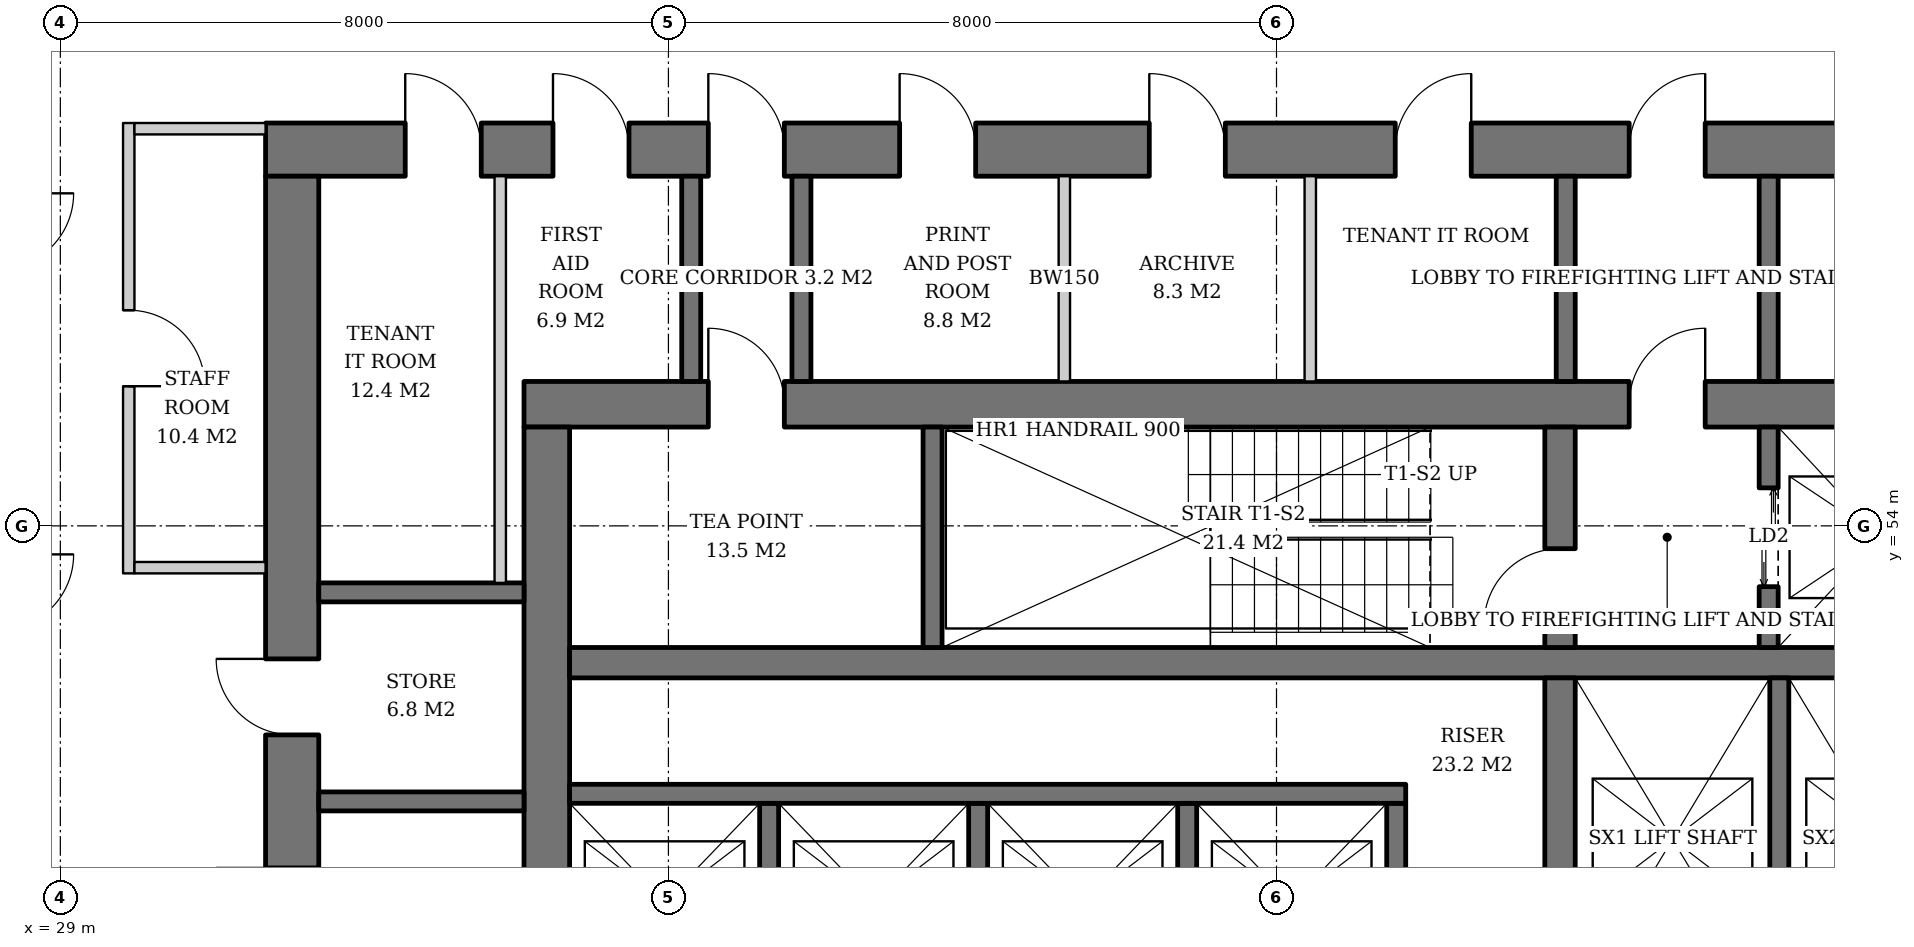
"""IFC4 building model, lengths in metres.
Left out: names, types, materials, properties, quantities, classifications, styles, units other than length and angle.
Written with IfcOpenShell. Run it as: python <this file> out.ifc"""

import sys

from ifc_helpers import new_model, si_unit, direction, frame, frame_2d, origin, place, context, subcontext, project, spatial, rectangle, extrude, element, fill, save


model = new_model("IFC4")
c1 = context("Model", 3, precision=1e-05, world=origin(), true_north=direction((0.0, 1.0)))
c2 = subcontext(c1, "Body", "Model", "MODEL_VIEW")
j1 = project(units=[si_unit("LENGTHUNIT", "METRE"), si_unit("PLANEANGLEUNIT", "RADIAN")], contexts=[c1])
p1 = place(None, origin())
s1 = spatial("IfcSite", under=j1, at=p1, CompositionType="ELEMENT")
p2 = place(p1, origin())
s2 = spatial("IfcBuilding", under=s1, at=p2, CompositionType="ELEMENT")
p3 = place(p2, frame((0.0, 0.0, 123.6)))
s3 = spatial("IfcBuildingStorey", under=s2, at=p3, CompositionType="ELEMENT", Elevation=123.6)
p4 = place(p3, frame((35.1, 55.6, 0.0), z_axis=(0.0, 0.0, 1.0), x_axis=(1.0, 0.0, 0.0)))
e1 = element("IfcWall", 1, at=p4, inside=s3, PredefinedType="SHEAR", context=c2, shape_type="SweptSolid", body=[
    extrude(rectangle(XDim=19.8, YDim=0.6, at=frame_2d((9.9, 0.0))), origin(), (0.0, 0.0, 1.0), 3.8),
])
p5 = place(p4, frame((14.54, 0.0, 0.0)))
e2 = element("IfcOpeningElement", 2, at=p5, cuts=e1, PredefinedType="OPENING", context=c2, shape_type="SweptSolid", body=[
    extrude(rectangle(XDim=1.0, YDim=2.1, at=frame_2d((0.5, 1.05))), frame((0.0, 0.31, 0.0), z_axis=(0.0, -1.0, 0.0), x_axis=(1.0, 0.0, 0.0)), (0.0, 0.0, 1.0), 0.62),
])
p6 = place(p4, frame((2.425, 0.0, 0.0)))
e3 = element("IfcOpeningElement", 3, at=p6, cuts=e1, PredefinedType="OPENING", context=c2, shape_type="SweptSolid", body=[
    extrude(rectangle(XDim=1.0, YDim=2.1, at=frame_2d((0.5, 1.05))), frame((0.0, 0.31, 0.0), z_axis=(0.0, -1.0, 0.0), x_axis=(1.0, 0.0, 0.0)), (0.0, 0.0, 1.0), 0.62),
])
p7 = place(p3, frame((35.4, 36.7, 0.0), z_axis=(0.0, 0.0, 1.0), x_axis=(0.0, 1.0, 0.0)))
e4 = element("IfcWall", 4, at=p7, inside=s3, PredefinedType="SHEAR", context=c2, shape_type="SweptSolid", body=[
    extrude(rectangle(XDim=18.6, YDim=0.6, at=frame_2d((9.3, 0.0))), origin(), (0.0, 0.0, 1.0), 3.8),
])
p8 = place(p7, frame((8.4, 0.0, 0.0)))
e5 = element("IfcOpeningElement", 5, at=p8, cuts=e4, PredefinedType="OPENING", context=c2, shape_type="SweptSolid", body=[
    extrude(rectangle(XDim=1.8, YDim=2.4, at=frame_2d((0.9, 1.2))), frame((0.0, 0.31, 0.0), z_axis=(0.0, -1.0, 0.0), x_axis=(1.0, 0.0, 0.0)), (0.0, 0.0, 1.0), 0.62),
])
p9 = place(p3, frame((31.7, 58.95, 0.0), z_axis=(0.0, 0.0, 1.0), x_axis=(1.0, 0.0, 0.0)))
e6 = element("IfcWall", 6, at=p9, inside=s3, PredefinedType="SHEAR", context=c2, shape_type="SweptSolid", body=[
    extrude(rectangle(XDim=26.6, YDim=0.7, at=frame_2d((13.3, 0.0))), origin(), (0.0, 0.0, 1.0), 3.8),
])
p10 = place(p9, frame((17.94, 0.0, 0.0)))
e7 = element("IfcOpeningElement", 7, at=p10, cuts=e6, PredefinedType="OPENING", context=c2, shape_type="SweptSolid", body=[
    extrude(rectangle(XDim=1.0, YDim=2.1, at=frame_2d((0.5, 1.05))), frame((0.0, 0.36, 0.0), z_axis=(0.0, -1.0, 0.0), x_axis=(1.0, 0.0, 0.0)), (0.0, 0.0, 1.0), 0.72),
])
p11 = place(p9, frame((5.825, 0.0, 0.0)))
e8 = element("IfcOpeningElement", 8, at=p11, cuts=e6, PredefinedType="OPENING", context=c2, shape_type="SweptSolid", body=[
    extrude(rectangle(XDim=1.0, YDim=2.1, at=frame_2d((0.5, 1.05))), frame((0.0, 0.36, 0.0), z_axis=(0.0, -1.0, 0.0), x_axis=(1.0, 0.0, 0.0)), (0.0, 0.0, 1.0), 0.72),
])
p12 = place(p9, frame((1.837, 0.0, 0.0)))
e9 = element("IfcOpeningElement", 9, at=p12, cuts=e6, PredefinedType="OPENING", context=c2, shape_type="SweptSolid", body=[
    extrude(rectangle(XDim=1.0, YDim=2.1, at=frame_2d((0.5, 1.05))), frame((0.0, 0.36, 0.0), z_axis=(0.0, -1.0, 0.0), x_axis=(1.0, 0.0, 0.0)), (0.0, 0.0, 1.0), 0.72),
])
p13 = place(p9, frame((3.781, 0.0, 0.0)))
e10 = element("IfcOpeningElement", 10, at=p13, cuts=e6, PredefinedType="OPENING", context=c2, shape_type="SweptSolid", body=[
    extrude(rectangle(XDim=1.0, YDim=2.1, at=frame_2d((0.5, 1.05))), frame((0.0, 0.36, 0.0), z_axis=(0.0, -1.0, 0.0), x_axis=(1.0, 0.0, 0.0)), (0.0, 0.0, 1.0), 0.72),
])
p14 = place(p9, frame((8.342, 0.0, 0.0)))
e11 = element("IfcOpeningElement", 11, at=p14, cuts=e6, PredefinedType="OPENING", context=c2, shape_type="SweptSolid", body=[
    extrude(rectangle(XDim=1.0, YDim=2.1, at=frame_2d((0.5, 1.05))), frame((0.0, 0.36, 0.0), z_axis=(0.0, -1.0, 0.0), x_axis=(1.0, 0.0, 0.0)), (0.0, 0.0, 1.0), 0.72),
])
p15 = place(p9, frame((11.626, 0.0, 0.0)))
e12 = element("IfcOpeningElement", 12, at=p15, cuts=e6, PredefinedType="OPENING", context=c2, shape_type="SweptSolid", body=[
    extrude(rectangle(XDim=1.0, YDim=2.1, at=frame_2d((0.5, 1.05))), frame((0.0, 0.36, 0.0), z_axis=(0.0, -1.0, 0.0), x_axis=(1.0, 0.0, 0.0)), (0.0, 0.0, 1.0), 0.72),
])
p16 = place(p9, frame((14.862, 0.0, 0.0)))
e13 = element("IfcOpeningElement", 13, at=p16, cuts=e6, PredefinedType="OPENING", context=c2, shape_type="SweptSolid", body=[
    extrude(rectangle(XDim=1.0, YDim=2.1, at=frame_2d((0.5, 1.05))), frame((0.0, 0.36, 0.0), z_axis=(0.0, -1.0, 0.0), x_axis=(1.0, 0.0, 0.0)), (0.0, 0.0, 1.0), 0.72),
])
p17 = place(p9, frame((20.9, 0.0, 0.0)))
e14 = element("IfcOpeningElement", 14, at=p17, cuts=e6, PredefinedType="OPENING", context=c2, shape_type="SweptSolid", body=[
    extrude(rectangle(XDim=1.0, YDim=2.1, at=frame_2d((0.5, 1.05))), frame((0.0, 0.36, 0.0), z_axis=(0.0, -1.0, 0.0), x_axis=(1.0, 0.0, 0.0)), (0.0, 0.0, 1.0), 0.72),
])
p18 = place(p9, frame((23.75, 0.0, 0.0)))
e15 = element("IfcOpeningElement", 15, at=p18, cuts=e6, PredefinedType="OPENING", context=c2, shape_type="SweptSolid", body=[
    extrude(rectangle(XDim=1.0, YDim=2.1, at=frame_2d((0.5, 1.05))), frame((0.0, 0.36, 0.0), z_axis=(0.0, -1.0, 0.0), x_axis=(1.0, 0.0, 0.0)), (0.0, 0.0, 1.0), 0.72),
])
p19 = place(p3, frame((32.05, 33.4, 0.0), z_axis=(0.0, 0.0, 1.0), x_axis=(0.0, 1.0, 0.0)))
e16 = element("IfcWall", 16, at=p19, inside=s3, PredefinedType="SHEAR", context=c2, shape_type="SweptSolid", body=[
    extrude(rectangle(XDim=25.2, YDim=0.7, at=frame_2d((12.6, 0.0))), origin(), (0.0, 0.0, 1.0), 3.8),
])
p20 = place(p19, frame((11.7, 0.0, 0.0)))
e17 = element("IfcOpeningElement", 17, at=p20, cuts=e16, PredefinedType="OPENING", context=c2, shape_type="SweptSolid", body=[
    extrude(rectangle(XDim=1.8, YDim=2.4, at=frame_2d((0.9, 1.2))), frame((0.0, 0.36, 0.0), z_axis=(0.0, -1.0, 0.0), x_axis=(1.0, 0.0, 0.0)), (0.0, 0.0, 1.0), 0.72),
])
p21 = place(p19, frame((3.6, 0.0, 0.0)))
e18 = element("IfcOpeningElement", 18, at=p21, cuts=e16, PredefinedType="OPENING", context=c2, shape_type="SweptSolid", body=[
    extrude(rectangle(XDim=1.0, YDim=2.1, at=frame_2d((0.5, 1.05))), frame((0.0, 0.36, 0.0), z_axis=(0.0, -1.0, 0.0), x_axis=(1.0, 0.0, 0.0)), (0.0, 0.0, 1.0), 0.72),
])
p22 = place(p19, frame((6.35, 0.0, 0.0)))
e19 = element("IfcOpeningElement", 19, at=p22, cuts=e16, PredefinedType="OPENING", context=c2, shape_type="SweptSolid", body=[
    extrude(rectangle(XDim=1.0, YDim=2.1, at=frame_2d((0.5, 1.05))), frame((0.0, 0.36, 0.0), z_axis=(0.0, -1.0, 0.0), x_axis=(1.0, 0.0, 0.0)), (0.0, 0.0, 1.0), 0.72),
])
p23 = place(p19, frame((9.1, 0.0, 0.0)))
e20 = element("IfcOpeningElement", 20, at=p23, cuts=e16, PredefinedType="OPENING", context=c2, shape_type="SweptSolid", body=[
    extrude(rectangle(XDim=1.0, YDim=2.1, at=frame_2d((0.5, 1.05))), frame((0.0, 0.36, 0.0), z_axis=(0.0, -1.0, 0.0), x_axis=(1.0, 0.0, 0.0)), (0.0, 0.0, 1.0), 0.72),
])
p24 = place(p19, frame((15.1, 0.0, 0.0)))
e21 = element("IfcOpeningElement", 21, at=p24, cuts=e16, PredefinedType="OPENING", context=c2, shape_type="SweptSolid", body=[
    extrude(rectangle(XDim=1.0, YDim=2.1, at=frame_2d((0.5, 1.05))), frame((0.0, 0.36, 0.0), z_axis=(0.0, -1.0, 0.0), x_axis=(1.0, 0.0, 0.0)), (0.0, 0.0, 1.0), 0.72),
])
p25 = place(p19, frame((17.85, 0.0, 0.0)))
e22 = element("IfcOpeningElement", 22, at=p25, cuts=e16, PredefinedType="OPENING", context=c2, shape_type="SweptSolid", body=[
    extrude(rectangle(XDim=1.0, YDim=2.1, at=frame_2d((0.5, 1.05))), frame((0.0, 0.36, 0.0), z_axis=(0.0, -1.0, 0.0), x_axis=(1.0, 0.0, 0.0)), (0.0, 0.0, 1.0), 0.72),
])
p26 = place(p3, frame((35.7, 52.2, 0.0), z_axis=(0.0, 0.0, 1.0), x_axis=(1.0, 0.0, 0.0)))
e23 = element("IfcWall", 23, at=p26, inside=s3, PredefinedType="SHEAR", context=c2, shape_type="SweptSolid", body=[
    extrude(rectangle(XDim=18.6, YDim=0.4, at=frame_2d((9.3, 0.0))), origin(), (0.0, 0.0, 1.0), 3.8),
])
p27 = place(p3, frame((48.73, 40.0, 0.0), z_axis=(0.0, 0.0, 1.0), x_axis=(0.0, 1.0, 0.0)))
e24 = element("IfcWall", 24, at=p27, inside=s3, PredefinedType="SHEAR", context=c2, shape_type="SweptSolid", body=[
    extrude(rectangle(XDim=12.0, YDim=0.4, at=frame_2d((6.0, 0.0))), origin(), (0.0, 0.0, 1.0), 3.8),
])
p28 = place(p3, frame((48.73, 52.4, 0.0), z_axis=(0.0, 0.0, 1.0), x_axis=(0.0, 1.0, 0.0)))
e25 = element("IfcWall", 25, at=p28, inside=s3, PredefinedType="SHEAR", context=c2, shape_type="SweptSolid", body=[
    extrude(rectangle(XDim=2.9, YDim=0.4, at=frame_2d((1.45, 0.0))), origin(), (0.0, 0.0, 1.0), 3.8),
])
p29 = place(p28, frame((0.3, 0.0, 0.0)))
e26 = element("IfcOpeningElement", 26, at=p29, cuts=e25, PredefinedType="OPENING", context=c2, shape_type="SweptSolid", body=[
    extrude(rectangle(XDim=1.0, YDim=2.1, at=frame_2d((0.5, 1.05))), frame((0.0, 0.21, 0.0), z_axis=(0.0, -1.0, 0.0), x_axis=(1.0, 0.0, 0.0)), (0.0, 0.0, 1.0), 0.42),
])
p30 = place(p3, frame((40.475, 52.4, 0.0), z_axis=(0.0, 0.0, 1.0), x_axis=(0.0, 1.0, 0.0)))
e27 = element("IfcWall", 27, at=p30, inside=s3, PredefinedType="SHEAR", context=c2, shape_type="SweptSolid", body=[
    extrude(rectangle(XDim=2.9, YDim=0.25, at=frame_2d((1.45, 0.0))), origin(), (0.0, 0.0, 1.0), 3.8),
])
p31 = place(p3, frame((51.475, 52.4, 0.0), z_axis=(0.0, 0.0, 1.0), x_axis=(0.0, 1.0, 0.0)))
e28 = element("IfcWall", 28, at=p31, inside=s3, PredefinedType="SHEAR", context=c2, shape_type="SweptSolid", body=[
    extrude(rectangle(XDim=2.9, YDim=0.25, at=frame_2d((1.45, 0.0))), origin(), (0.0, 0.0, 1.0), 3.8),
])
p32 = place(p31, frame((0.8, 0.0, 0.0)))
e29 = element("IfcOpeningElement", 29, at=p32, cuts=e28, PredefinedType="OPENING", context=c2, shape_type="SweptSolid", body=[
    extrude(rectangle(XDim=1.3, YDim=2.2, at=frame_2d((0.65, 1.1))), frame((0.0, 0.135, 0.0), z_axis=(0.0, -1.0, 0.0), x_axis=(1.0, 0.0, 0.0)), (0.0, 0.0, 1.0), 0.27),
])
for number, where, z_axis, x_axis in (
    (30, (38.325, 47.75, 0.0), (0.0, 0.0, 1.0), (0.0, 1.0, 0.0)),
    (31, (41.075, 47.75, 0.0), (0.0, 0.0, 1.0), (0.0, 1.0, 0.0)),
    (32, (43.825, 47.75, 0.0), (0.0, 0.0, 1.0), (0.0, 1.0, 0.0)),
    (33, (46.575, 47.75, 0.0), (0.0, 0.0, 1.0), (0.0, 1.0, 0.0)),
):
    element("IfcWall", number, at=place(p3, frame(where, z_axis=z_axis, x_axis=x_axis)), inside=s3, PredefinedType="SHEAR", context=c2, shape_type="SweptSolid", body=[
        extrude(rectangle(XDim=2.6, YDim=0.25, at=frame_2d((1.3, 0.0))), origin(), (0.0, 0.0, 1.0), 3.8),
    ])
p33 = place(p3, frame((35.7, 50.475, 0.0), z_axis=(0.0, 0.0, 1.0), x_axis=(1.0, 0.0, 0.0)))
e34 = element("IfcWall", 34, at=p33, inside=s3, PredefinedType="SHEAR", context=c2, shape_type="SweptSolid", body=[
    extrude(rectangle(XDim=11.0, YDim=0.25, at=frame_2d((5.5, 0.0))), origin(), (0.0, 0.0, 1.0), 3.8),
])
p34 = place(p3, frame((51.615, 47.75, 0.0), z_axis=(0.0, 0.0, 1.0), x_axis=(0.0, 1.0, 0.0)))
e35 = element("IfcWall", 35, at=p34, inside=s3, PredefinedType="SHEAR", context=c2, shape_type="SweptSolid", body=[
    extrude(rectangle(XDim=4.25, YDim=0.25, at=frame_2d((2.125, 0.0))), origin(), (0.0, 0.0, 1.0), 3.8),
])
for number, where, z_axis, x_axis in (
    (36, (32.4, 50.375, 0.0), (0.0, 0.0, 1.0), (1.0, 0.0, 0.0)),
    (37, (32.4, 53.125, 0.0), (0.0, 0.0, 1.0), (1.0, 0.0, 0.0)),
):
    element("IfcWall", number, at=place(p3, frame(where, z_axis=z_axis, x_axis=x_axis)), inside=s3, PredefinedType="SHEAR", context=c2, shape_type="SweptSolid", body=[
        extrude(rectangle(XDim=2.7, YDim=0.25, at=frame_2d((1.35, 0.0))), origin(), (0.0, 0.0, 1.0), 3.8),
    ])
for number, where, z_axis, x_axis in (
    (38, (48.805, 55.9, 0.0), (0.0, 0.0, 1.0), (0.0, 1.0, 0.0)),
    (39, (51.475, 55.9, 0.0), (0.0, 0.0, 1.0), (0.0, 1.0, 0.0)),
    (40, (37.3, 55.9, 0.0), (0.0, 0.0, 1.0), (0.0, 1.0, 0.0)),
    (41, (38.75, 55.9, 0.0), (0.0, 0.0, 1.0), (0.0, 1.0, 0.0)),
):
    element("IfcWall", number, at=place(p3, frame(where, z_axis=z_axis, x_axis=x_axis)), inside=s3, PredefinedType="SOLIDWALL", context=c2, shape_type="SweptSolid", body=[
        extrude(rectangle(XDim=2.7, YDim=0.25, at=frame_2d((1.35, 0.0))), origin(), (0.0, 0.0, 1.0), 3.62),
    ])
p35 = place(p3, frame((34.788, 53.25, 0.0), z_axis=(0.0, 0.0, 1.0), x_axis=(0.0, 1.0, 0.0)))
e42 = element("IfcWall", 42, at=p35, inside=s3, PredefinedType="SOLIDWALL", context=c2, shape_type="SweptSolid", body=[
    extrude(rectangle(XDim=5.35, YDim=0.15, at=frame_2d((2.675, 0.0))), origin(), (0.0, 0.0, 1.0), 3.62),
])
for number, where, z_axis, x_axis in (
    (43, (42.209, 55.9, 0.0), (0.0, 0.0, 1.0), (0.0, 1.0, 0.0)),
    (44, (45.444, 55.9, 0.0), (0.0, 0.0, 1.0), (0.0, 1.0, 0.0)),
):
    element("IfcWall", number, at=place(p3, frame(where, z_axis=z_axis, x_axis=x_axis)), inside=s3, PredefinedType="SOLIDWALL", context=c2, shape_type="SweptSolid", body=[
        extrude(rectangle(XDim=2.7, YDim=0.15, at=frame_2d((1.35, 0.0))), origin(), (0.0, 0.0, 1.0), 3.62),
    ])
p36 = place(p3, frame((29.9, 59.3, 0.0), z_axis=(0.0, 0.0, 1.0), x_axis=(0.0, -1.0, 0.0)))
e45 = element("IfcWall", 45, at=p36, inside=s3, PredefinedType="PARTITIONING", context=c2, shape_type="SweptSolid", body=[
    extrude(rectangle(XDim=5.925, YDim=0.15, at=frame_2d((2.962, 0.0))), origin(), (0.0, 0.0, 1.0), 2.72),
])
p37 = place(p36, frame((2.462, 0.0, 0.0)))
e46 = element("IfcOpeningElement", 46, at=p37, cuts=e45, PredefinedType="OPENING", context=c2, shape_type="SweptSolid", body=[
    extrude(rectangle(XDim=1.0, YDim=2.1, at=frame_2d((0.5, 1.05))), frame((0.0, 0.085, 0.0), z_axis=(0.0, -1.0, 0.0), x_axis=(1.0, 0.0, 0.0)), (0.0, 0.0, 1.0), 0.17),
])
for number, where, z_axis, x_axis in (
    (47, (31.7, 59.225, 0.0), (0.0, 0.0, 1.0), (-1.0, 0.0, 0.0)),
    (48, (31.7, 53.45, 0.0), (0.0, 0.0, 1.0), (-1.0, 0.0, 0.0)),
):
    element("IfcWall", number, at=place(p3, frame(where, z_axis=z_axis, x_axis=x_axis)), inside=s3, PredefinedType="PARTITIONING", context=c2, shape_type="SweptSolid", body=[
        extrude(rectangle(XDim=1.725, YDim=0.15, at=frame_2d((0.862, 0.0))), origin(), (0.0, 0.0, 1.0), 3.62),
    ])
p38 = place(p32, origin())
e49 = element("IfcDoor", 49, at=p38, inside=s3, OperationType="DOUBLE_DOOR_SLIDING", PredefinedType="DOOR", context=c2, shape_type="SweptSolid", body=[
    extrude(rectangle(XDim=1.3, YDim=2.2, at=frame_2d((0.65, 1.1))), frame((0.0, 0.025, 0.0), z_axis=(0.0, -1.0, 0.0), x_axis=(1.0, 0.0, 0.0)), (0.0, 0.0, 1.0), 0.05),
])
fill(e29, e49)
p39 = place(p29, origin())
e50 = element("IfcDoor", 50, at=p39, inside=s3, OperationType="SINGLE_SWING_LEFT", PredefinedType="DOOR", context=c2, shape_type="SweptSolid", body=[
    extrude(rectangle(XDim=1.0, YDim=2.1, at=frame_2d((0.5, 1.05))), frame((0.0, 0.025, 0.0), z_axis=(0.0, -1.0, 0.0), x_axis=(1.0, 0.0, 0.0)), (0.0, 0.0, 1.0), 0.05),
])
fill(e26, e50)
p40 = place(p5, origin())
e51 = element("IfcDoor", 51, at=p40, inside=s3, OperationType="SINGLE_SWING_RIGHT", PredefinedType="DOOR", context=c2, shape_type="SweptSolid", body=[
    extrude(rectangle(XDim=1.0, YDim=2.1, at=frame_2d((0.5, 1.05))), frame((0.0, 0.025, 0.0), z_axis=(0.0, -1.0, 0.0), x_axis=(1.0, 0.0, 0.0)), (0.0, 0.0, 1.0), 0.05),
])
fill(e2, e51)
p41 = place(p10, origin())
e52 = element("IfcDoor", 52, at=p41, inside=s3, OperationType="SINGLE_SWING_RIGHT", PredefinedType="DOOR", context=c2, shape_type="SweptSolid", body=[
    extrude(rectangle(XDim=1.0, YDim=2.1, at=frame_2d((0.5, 1.05))), frame((0.0, 0.025, 0.0), z_axis=(0.0, -1.0, 0.0), x_axis=(1.0, 0.0, 0.0)), (0.0, 0.0, 1.0), 0.05),
])
fill(e7, e52)
p42 = place(p11, origin())
e53 = element("IfcDoor", 53, at=p42, inside=s3, OperationType="SINGLE_SWING_LEFT", PredefinedType="DOOR", context=c2, shape_type="SweptSolid", body=[
    extrude(rectangle(XDim=1.0, YDim=2.1, at=frame_2d((0.5, 1.05))), frame((0.0, 0.025, 0.0), z_axis=(0.0, -1.0, 0.0), x_axis=(1.0, 0.0, 0.0)), (0.0, 0.0, 1.0), 0.05),
])
fill(e8, e53)
p43 = place(p6, origin())
e54 = element("IfcDoor", 54, at=p43, inside=s3, OperationType="SINGLE_SWING_LEFT", PredefinedType="DOOR", context=c2, shape_type="SweptSolid", body=[
    extrude(rectangle(XDim=1.0, YDim=2.1, at=frame_2d((0.5, 1.05))), frame((0.0, -0.24, 0.0), z_axis=(0.0, -1.0, 0.0), x_axis=(1.0, 0.0, 0.0)), (0.0, 0.0, 1.0), 0.05),
])
fill(e3, e54)
p44 = place(p25, origin())
e55 = element("IfcDoor", 55, at=p44, inside=s3, OperationType="SINGLE_SWING_RIGHT", PredefinedType="DOOR", context=c2, shape_type="SweptSolid", body=[
    extrude(rectangle(XDim=1.0, YDim=2.1, at=frame_2d((0.5, 1.05))), frame((0.0, -0.29, 0.0), z_axis=(0.0, -1.0, 0.0), x_axis=(1.0, 0.0, 0.0)), (0.0, 0.0, 1.0), 0.05),
])
fill(e22, e55)
p45 = place(p12, origin())
e56 = element("IfcDoor", 56, at=p45, inside=s3, OperationType="SINGLE_SWING_LEFT", PredefinedType="DOOR", context=c2, shape_type="SweptSolid", body=[
    extrude(rectangle(XDim=1.0, YDim=2.1, at=frame_2d((0.5, 1.05))), frame((0.0, -0.29, 0.0), z_axis=(0.0, -1.0, 0.0), x_axis=(1.0, 0.0, 0.0)), (0.0, 0.0, 1.0), 0.05),
])
fill(e9, e56)
p46 = place(p13, origin())
e57 = element("IfcDoor", 57, at=p46, inside=s3, OperationType="SINGLE_SWING_LEFT", PredefinedType="DOOR", context=c2, shape_type="SweptSolid", body=[
    extrude(rectangle(XDim=1.0, YDim=2.1, at=frame_2d((0.5, 1.05))), frame((0.0, -0.29, 0.0), z_axis=(0.0, -1.0, 0.0), x_axis=(1.0, 0.0, 0.0)), (0.0, 0.0, 1.0), 0.05),
])
fill(e10, e57)
p47 = place(p14, origin())
e58 = element("IfcDoor", 58, at=p47, inside=s3, OperationType="SINGLE_SWING_LEFT", PredefinedType="DOOR", context=c2, shape_type="SweptSolid", body=[
    extrude(rectangle(XDim=1.0, YDim=2.1, at=frame_2d((0.5, 1.05))), frame((0.0, -0.29, 0.0), z_axis=(0.0, -1.0, 0.0), x_axis=(1.0, 0.0, 0.0)), (0.0, 0.0, 1.0), 0.05),
])
fill(e11, e58)
p48 = place(p15, origin())
e59 = element("IfcDoor", 59, at=p48, inside=s3, OperationType="SINGLE_SWING_LEFT", PredefinedType="DOOR", context=c2, shape_type="SweptSolid", body=[
    extrude(rectangle(XDim=1.0, YDim=2.1, at=frame_2d((0.5, 1.05))), frame((0.0, -0.29, 0.0), z_axis=(0.0, -1.0, 0.0), x_axis=(1.0, 0.0, 0.0)), (0.0, 0.0, 1.0), 0.05),
])
fill(e12, e59)
p49 = place(p16, origin())
e60 = element("IfcDoor", 60, at=p49, inside=s3, OperationType="SINGLE_SWING_RIGHT", PredefinedType="DOOR", context=c2, shape_type="SweptSolid", body=[
    extrude(rectangle(XDim=1.0, YDim=2.1, at=frame_2d((0.5, 1.05))), frame((0.0, -0.29, 0.0), z_axis=(0.0, -1.0, 0.0), x_axis=(1.0, 0.0, 0.0)), (0.0, 0.0, 1.0), 0.05),
])
fill(e13, e60)
p50 = place(p37, origin())
e61 = element("IfcDoor", 61, at=p50, inside=s3, OperationType="SINGLE_SWING_RIGHT", PredefinedType="DOOR", context=c2, shape_type="SweptSolid", body=[
    extrude(rectangle(XDim=1.0, YDim=2.1, at=frame_2d((0.5, 1.05))), frame((0.0, 0.025, 0.0), z_axis=(0.0, -1.0, 0.0), x_axis=(1.0, 0.0, 0.0)), (0.0, 0.0, 1.0), 0.05),
])
fill(e46, e61)
save(model, sys.argv[1])
